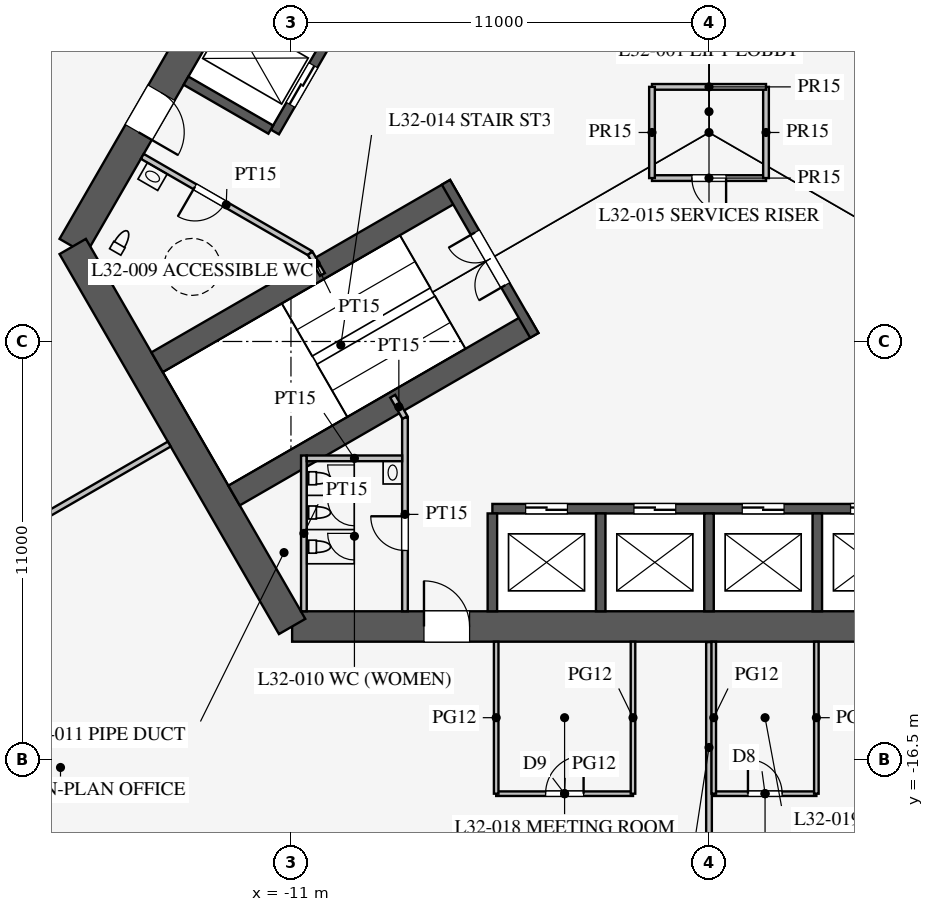
"""IFC4 building model, lengths in metres.
Left out: names, types, materials, properties, quantities, classifications, styles, units other than length and angle.
Written with IfcOpenShell. Run it as: python <this file> out.ifc"""

import sys

from ifc_helpers import new_model, si_unit, direction, frame, frame_2d, origin, place, context, subcontext, project, spatial, rectangle, extrude, element, fill, save


model = new_model("IFC4")
c1 = context("Model", 3, precision=1e-05, world=origin(), true_north=direction((0.0, 1.0)))
c2 = subcontext(c1, "Body", "Model", "MODEL_VIEW")
j1 = project(units=[si_unit("LENGTHUNIT", "METRE"), si_unit("PLANEANGLEUNIT", "RADIAN")], contexts=[c1])
p1 = place(None, origin())
s1 = spatial("IfcSite", under=j1, at=p1, CompositionType="ELEMENT")
p2 = place(p1, origin())
s2 = spatial("IfcBuilding", under=s1, at=p2, CompositionType="ELEMENT")
p3 = place(p2, frame((0.0, 0.0, 140.9)))
s3 = spatial("IfcBuildingStorey", under=s2, at=p3, CompositionType="ELEMENT", Elevation=140.9)
p4 = place(p3, frame((-10.97, -13.0, 0.0), z_axis=(0.0, 0.0, 1.0), x_axis=(1.0, 0.0, 0.0)))
e1 = element("IfcWall", 1, at=p4, inside=s3, PredefinedType="SHEAR", context=c2, shape_type="SweptSolid", body=[
    extrude(rectangle(XDim=21.939, YDim=0.8, at=frame_2d((10.97, 0.0))), origin(), (0.0, 0.0, 1.0), 4.2),
])
p5 = place(p4, frame((17.27, 0.0, 0.0)))
e2 = element("IfcOpeningElement", 2, at=p5, cuts=e1, PredefinedType="OPENING", context=c2, shape_type="SweptSolid", body=[
    extrude(rectangle(XDim=1.2, YDim=2.1, at=frame_2d((0.6, 1.05))), frame((0.0, 0.41, 0.0), z_axis=(0.0, -1.0, 0.0), x_axis=(1.0, 0.0, 0.0)), (0.0, 0.0, 1.0), 0.82),
])
p6 = place(p4, frame((3.47, 0.0, 0.0)))
e3 = element("IfcOpeningElement", 3, at=p6, cuts=e1, PredefinedType="OPENING", context=c2, shape_type="SweptSolid", body=[
    extrude(rectangle(XDim=1.2, YDim=2.1, at=frame_2d((0.6, 1.05))), frame((0.0, 0.41, 0.0), z_axis=(0.0, -1.0, 0.0), x_axis=(1.0, 0.0, 0.0)), (0.0, 0.0, 1.0), 0.82),
])
p7 = place(p3, frame((-5.773, 16.0, 0.0), z_axis=(0.0, 0.0, 1.0), x_axis=(-0.500002442456, -0.866023993627, 0.0)))
e4 = element("IfcWall", 4, at=p7, inside=s3, PredefinedType="SHEAR", context=c2, shape_type="SweptSolid", body=[
    extrude(rectangle(XDim=21.939, YDim=0.8, at=frame_2d((10.97, 0.0))), origin(), (0.0, 0.0, 1.0), 4.2),
])
p8 = place(p7, frame((17.27, 0.0, 0.0)))
e5 = element("IfcOpeningElement", 5, at=p8, cuts=e4, PredefinedType="OPENING", context=c2, shape_type="SweptSolid", body=[
    extrude(rectangle(XDim=1.2, YDim=2.1, at=frame_2d((0.6, 1.05))), frame((0.0, 0.41, 0.0), z_axis=(0.0, -1.0, 0.0), x_axis=(1.0, 0.0, 0.0)), (0.0, 0.0, 1.0), 0.82),
])
p9 = place(p7, frame((3.47, 0.0, 0.0)))
e6 = element("IfcOpeningElement", 6, at=p9, cuts=e4, PredefinedType="OPENING", context=c2, shape_type="SweptSolid", body=[
    extrude(rectangle(XDim=1.2, YDim=2.1, at=frame_2d((0.6, 1.05))), frame((0.0, 0.41, 0.0), z_axis=(0.0, -1.0, 0.0), x_axis=(1.0, 0.0, 0.0)), (0.0, 0.0, 1.0), 0.82),
])
p10 = place(p3, frame((-16.743, -3.0, 0.0), z_axis=(0.0, 0.0, 1.0), x_axis=(0.499995765644, -0.866027848477, 0.0)))
e7 = element("IfcWall", 7, at=p10, inside=s3, PredefinedType="SHEAR", context=c2, shape_type="SweptSolid", body=[
    extrude(rectangle(XDim=11.547, YDim=0.8, at=frame_2d((5.773, 0.0))), origin(), (0.0, 0.0, 1.0), 4.2),
])
p11 = place(p3, frame((-5.7, -9.9, 0.0), z_axis=(0.0, 0.0, 1.0), x_axis=(1.0, 0.0, 0.0)))
e8 = element("IfcWall", 8, at=p11, inside=s3, PredefinedType="SHEAR", context=c2, shape_type="SweptSolid", body=[
    extrude(rectangle(XDim=11.4, YDim=0.25, at=frame_2d((5.7, 0.0))), origin(), (0.0, 0.0, 1.0), 4.2),
])
p12 = place(p11, frame((0.875, 0.0, 0.0)))
e9 = element("IfcOpeningElement", 9, at=p12, cuts=e8, PredefinedType="OPENING", context=c2, shape_type="SweptSolid", body=[
    extrude(rectangle(XDim=1.1, YDim=2.2, at=frame_2d((0.55, 1.1))), frame((0.0, 0.135, 0.0), z_axis=(0.0, -1.0, 0.0), x_axis=(1.0, 0.0, 0.0)), (0.0, 0.0, 1.0), 0.27),
])
p13 = place(p11, frame((3.725, 0.0, 0.0)))
e10 = element("IfcOpeningElement", 10, at=p13, cuts=e8, PredefinedType="OPENING", context=c2, shape_type="SweptSolid", body=[
    extrude(rectangle(XDim=1.1, YDim=2.2, at=frame_2d((0.55, 1.1))), frame((0.0, 0.135, 0.0), z_axis=(0.0, -1.0, 0.0), x_axis=(1.0, 0.0, 0.0)), (0.0, 0.0, 1.0), 0.27),
])
p14 = place(p11, frame((6.575, 0.0, 0.0)))
e11 = element("IfcOpeningElement", 11, at=p14, cuts=e8, PredefinedType="OPENING", context=c2, shape_type="SweptSolid", body=[
    extrude(rectangle(XDim=1.1, YDim=2.2, at=frame_2d((0.55, 1.1))), frame((0.0, 0.135, 0.0), z_axis=(0.0, -1.0, 0.0), x_axis=(1.0, 0.0, 0.0)), (0.0, 0.0, 1.0), 0.27),
])
p15 = place(p11, frame((9.425, 0.0, 0.0)))
e12 = element("IfcOpeningElement", 12, at=p15, cuts=e8, PredefinedType="OPENING", context=c2, shape_type="SweptSolid", body=[
    extrude(rectangle(XDim=1.1, YDim=2.2, at=frame_2d((0.55, 1.1))), frame((0.0, 0.135, 0.0), z_axis=(0.0, -1.0, 0.0), x_axis=(1.0, 0.0, 0.0)), (0.0, 0.0, 1.0), 0.27),
])
for number, where, z_axis, x_axis in (
    (13, (-5.7, -10.025, 0.0), (0.0, 0.0, 1.0), (0.0, -1.0, 0.0)),
    (14, (-2.85, -10.025, 0.0), (0.0, 0.0, 1.0), (0.0, -1.0, 0.0)),
    (15, (0.0, -10.025, 0.0), (0.0, 0.0, 1.0), (0.0, -1.0, 0.0)),
    (16, (2.85, -10.025, 0.0), (0.0, 0.0, 1.0), (0.0, -1.0, 0.0)),
):
    element("IfcWall", number, at=place(p3, frame(where, z_axis=z_axis, x_axis=x_axis)), inside=s3, PredefinedType="SHEAR", context=c2, shape_type="SweptSolid", body=[
        extrude(rectangle(XDim=2.575, YDim=0.25, at=frame_2d((1.288, 0.0))), origin(), (0.0, 0.0, 1.0), 4.2),
    ])
p16 = place(p3, frame((-5.724, 9.886, 0.0), z_axis=(0.0, 0.0, 1.0), x_axis=(-0.500001763848, -0.866024385424, 0.0)))
e17 = element("IfcWall", 17, at=p16, inside=s3, PredefinedType="SHEAR", context=c2, shape_type="SweptSolid", body=[
    extrude(rectangle(XDim=11.4, YDim=0.25, at=frame_2d((5.7, 0.0))), origin(), (0.0, 0.0, 1.0), 4.2),
])
p17 = place(p16, frame((6.525, 0.0, 0.0)))
e18 = element("IfcOpeningElement", 18, at=p17, cuts=e17, PredefinedType="OPENING", context=c2, shape_type="SweptSolid", body=[
    extrude(rectangle(XDim=1.2, YDim=2.2, at=frame_2d((0.6, 1.1))), frame((0.0, 0.135, 0.0), z_axis=(0.0, -1.0, 0.0), x_axis=(1.0, 0.0, 0.0)), (0.0, 0.0, 1.0), 0.27),
])
p18 = place(p16, frame((9.375, 0.0, 0.0)))
e19 = element("IfcOpeningElement", 19, at=p18, cuts=e17, PredefinedType="OPENING", context=c2, shape_type="SweptSolid", body=[
    extrude(rectangle(XDim=1.2, YDim=2.2, at=frame_2d((0.6, 1.1))), frame((0.0, 0.135, 0.0), z_axis=(0.0, -1.0, 0.0), x_axis=(1.0, 0.0, 0.0)), (0.0, 0.0, 1.0), 0.27),
])
p19 = place(p3, frame((-11.532, 0.076, 0.0), z_axis=(0.0, 0.0, 1.0), x_axis=(-0.866005588531, 0.500034319456, 0.0)))
e20 = element("IfcWall", 20, at=p19, inside=s3, PredefinedType="SHEAR", context=c2, shape_type="SweptSolid", body=[
    extrude(rectangle(XDim=2.575, YDim=0.25, at=frame_2d((1.288, 0.0))), origin(), (0.0, 0.0, 1.0), 4.2),
])
for number, where, z_axis, x_axis in (
    (21, (-6.663, -1.509, 0.0), (0.0, 0.0, 1.0), (-0.866, -0.5, 0.0)),
    (22, (-4.638, -5.016, 0.0), (0.0, 0.0, 1.0), (-0.866, -0.5, 0.0)),
):
    element("IfcWall", number, at=place(p3, frame(where, z_axis=z_axis, x_axis=x_axis)), inside=s3, PredefinedType="SHEAR", context=c2, shape_type="SweptSolid", body=[
        extrude(rectangle(XDim=9.075, YDim=0.6, at=frame_2d((4.538, 0.0))), origin(), (0.0, 0.0, 1.0), 4.2),
    ])
p20 = place(p3, frame((-6.922, -1.312, 0.0), z_axis=(0.0, 0.0, 1.0), x_axis=(0.499984536904, -0.866034331223, 0.0)))
e23 = element("IfcWall", 23, at=p20, inside=s3, PredefinedType="SHEAR", context=c2, shape_type="SweptSolid", body=[
    extrude(rectangle(XDim=4.65, YDim=0.25, at=frame_2d((2.325, 0.0))), origin(), (0.0, 0.0, 1.0), 4.2),
])
p21 = place(p20, frame((1.525, 0.0, 0.0)))
e24 = element("IfcOpeningElement", 24, at=p21, cuts=e23, PredefinedType="OPENING", context=c2, shape_type="SweptSolid", body=[
    extrude(rectangle(XDim=1.6, YDim=2.1, at=frame_2d((0.8, 1.05))), frame((0.0, 0.135, 0.0), z_axis=(0.0, -1.0, 0.0), x_axis=(1.0, 0.0, 0.0)), (0.0, 0.0, 1.0), 0.27),
])
p22 = place(p3, frame((-8.0, -7.5, 0.0), z_axis=(0.0, 0.0, 1.0), x_axis=(0.0, -1.0, 0.0)))
e25 = element("IfcWall", 25, at=p22, inside=s3, PredefinedType="PARTITIONING", context=c2, shape_type="SweptSolid", body=[
    extrude(rectangle(XDim=5.1, YDim=0.15, at=frame_2d((2.55, 0.0))), origin(), (0.0, 0.0, 1.0), 4.0),
])
p23 = place(p22, frame((2.6, 0.0, 0.0)))
e26 = element("IfcOpeningElement", 26, at=p23, cuts=e25, PredefinedType="OPENING", context=c2, shape_type="SweptSolid", body=[
    extrude(rectangle(XDim=0.9, YDim=2.1, at=frame_2d((0.45, 1.05))), frame((0.0, 0.085, 0.0), z_axis=(0.0, -1.0, 0.0), x_axis=(1.0, 0.0, 0.0)), (0.0, 0.0, 1.0), 0.17),
])
p24 = place(p3, frame((-10.495, -3.178, 0.0), z_axis=(0.0, 0.0, 1.0), x_axis=(-0.86602216432, 0.500005610874, 0.0)))
e27 = element("IfcWall", 27, at=p24, inside=s3, PredefinedType="PARTITIONING", context=c2, shape_type="SweptSolid", body=[
    extrude(rectangle(XDim=5.1, YDim=0.15, at=frame_2d((2.55, 0.0))), origin(), (0.0, 0.0, 1.0), 4.0),
])
p25 = place(p24, frame((2.6, 0.0, 0.0)))
e28 = element("IfcOpeningElement", 28, at=p25, cuts=e27, PredefinedType="OPENING", context=c2, shape_type="SweptSolid", body=[
    extrude(rectangle(XDim=0.9, YDim=2.1, at=frame_2d((0.45, 1.05))), frame((0.0, 0.085, 0.0), z_axis=(0.0, -1.0, 0.0), x_axis=(1.0, 0.0, 0.0)), (0.0, 0.0, 1.0), 0.17),
])
for number, where, z_axis, x_axis in (
    (29, (-10.495, -3.178, 0.0), (0.0, 0.0, 1.0), (0.5, -0.866, 0.0)),
    (30, (-8.0, -7.5, 0.0), (0.0, 0.0, 1.0), (-0.5, 0.866, 0.0)),
):
    element("IfcWall", number, at=place(p3, frame(where, z_axis=z_axis, x_axis=x_axis)), inside=s3, PredefinedType="PARTITIONING", context=c2, shape_type="SweptSolid", body=[
        extrude(rectangle(XDim=0.645, YDim=0.15, at=frame_2d((0.323, 0.0))), origin(), (0.0, 0.0, 1.0), 4.0),
    ])
p26 = place(p3, frame((-10.66, -8.5, 0.0), z_axis=(0.0, 0.0, 1.0), x_axis=(0.0, -1.0, 0.0)))
e31 = element("IfcWall", 31, at=p26, inside=s3, PredefinedType="PARTITIONING", context=c2, shape_type="SweptSolid", body=[
    extrude(rectangle(XDim=4.1, YDim=0.15, at=frame_2d((2.05, 0.0))), origin(), (0.0, 0.0, 1.0), 4.0),
])
p27 = place(p3, frame((-8.075, -8.575, 0.0), z_axis=(0.0, 0.0, 1.0), x_axis=(-1.0, 0.0, 0.0)))
e32 = element("IfcWall", 32, at=p27, inside=s3, PredefinedType="PARTITIONING", context=c2, shape_type="SweptSolid", body=[
    extrude(rectangle(XDim=2.51, YDim=0.15, at=frame_2d((1.255, 0.0))), origin(), (0.0, 0.0, 1.0), 4.0),
])
p28 = place(p3, frame((-1.5, -1.2, 0.0), z_axis=(0.0, 0.0, 1.0), x_axis=(1.0, 0.0, 0.0)))
e33 = element("IfcWall", 33, at=p28, inside=s3, PredefinedType="PARTITIONING", context=c2, shape_type="SweptSolid", body=[
    extrude(rectangle(XDim=3.0, YDim=0.15, at=frame_2d((1.5, 0.0))), origin(), (0.0, 0.0, 1.0), 4.0),
])
p29 = place(p28, frame((1.05, 0.0, 0.0)))
e34 = element("IfcOpeningElement", 34, at=p29, cuts=e33, PredefinedType="OPENING", context=c2, shape_type="SweptSolid", body=[
    extrude(rectangle(XDim=0.9, YDim=2.1, at=frame_2d((0.45, 1.05))), frame((0.0, 0.085, 0.0), z_axis=(0.0, -1.0, 0.0), x_axis=(1.0, 0.0, 0.0)), (0.0, 0.0, 1.0), 0.17),
])
p30 = place(p3, frame((1.5, -1.2, 0.0), z_axis=(0.0, 0.0, 1.0), x_axis=(0.0, 1.0, 0.0)))
e35 = element("IfcWall", 35, at=p30, inside=s3, PredefinedType="PARTITIONING", context=c2, shape_type="SweptSolid", body=[
    extrude(rectangle(XDim=2.4, YDim=0.15, at=frame_2d((1.2, 0.0))), origin(), (0.0, 0.0, 1.0), 4.0),
])
p31 = place(p3, frame((1.5, 1.2, 0.0), z_axis=(0.0, 0.0, 1.0), x_axis=(-1.0, 0.0, 0.0)))
e36 = element("IfcWall", 36, at=p31, inside=s3, PredefinedType="PARTITIONING", context=c2, shape_type="SweptSolid", body=[
    extrude(rectangle(XDim=3.0, YDim=0.15, at=frame_2d((1.5, 0.0))), origin(), (0.0, 0.0, 1.0), 4.0),
])
p32 = place(p3, frame((-1.5, 1.2, 0.0), z_axis=(0.0, 0.0, 1.0), x_axis=(0.0, -1.0, 0.0)))
e37 = element("IfcWall", 37, at=p32, inside=s3, PredefinedType="PARTITIONING", context=c2, shape_type="SweptSolid", body=[
    extrude(rectangle(XDim=2.4, YDim=0.15, at=frame_2d((1.2, 0.0))), origin(), (0.0, 0.0, 1.0), 4.0),
])
p33 = place(p3, frame((-14.203, -8.2, 0.0), z_axis=(0.0, 0.0, 1.0), x_axis=(-0.866024668836, -0.500001272966, 0.0)))
e38 = element("IfcWall", 38, at=p33, inside=s3, PredefinedType="PARTITIONING", context=c2, shape_type="SweptSolid", body=[
    extrude(rectangle(XDim=16.65, YDim=0.15, at=frame_2d((8.325, 0.0))), origin(), (0.0, 0.0, 1.0), 2.3),
])
p34 = place(p3, frame((0.0, -13.41, 0.0), z_axis=(0.0, 0.0, 1.0), x_axis=(0.0, -1.0, 0.0)))
e39 = element("IfcWall", 39, at=p34, inside=s3, PredefinedType="PARTITIONING", context=c2, shape_type="SweptSolid", body=[
    extrude(rectangle(XDim=11.585, YDim=0.15, at=frame_2d((5.792, 0.0))), origin(), (0.0, 0.0, 1.0), 3.2),
])
p35 = place(p3, frame((0.125, -17.4, 0.0), z_axis=(0.0, 0.0, 1.0), x_axis=(1.0, 0.0, 0.0)))
e40 = element("IfcWall", 40, at=p35, inside=s3, PredefinedType="PARTITIONING", context=c2, shape_type="SweptSolid", body=[
    extrude(rectangle(XDim=2.7, YDim=0.12, at=frame_2d((1.35, 0.0))), origin(), (0.0, 0.0, 1.0), 2.9),
])
p36 = place(p35, frame((0.9, 0.0, 0.15)))
e41 = element("IfcOpeningElement", 41, at=p36, cuts=e40, PredefinedType="OPENING", context=c2, shape_type="SweptSolid", body=[
    extrude(rectangle(XDim=0.9, YDim=2.1, at=frame_2d((0.45, 1.05))), frame((0.0, 0.07, 0.0), z_axis=(0.0, -1.0, 0.0), x_axis=(1.0, 0.0, 0.0)), (0.0, 0.0, 1.0), 0.14),
])
p37 = place(p3, frame((-5.6, -17.4, 0.0), z_axis=(0.0, 0.0, 1.0), x_axis=(1.0, 0.0, 0.0)))
e42 = element("IfcWall", 42, at=p37, inside=s3, PredefinedType="PARTITIONING", context=c2, shape_type="SweptSolid", body=[
    extrude(rectangle(XDim=3.6, YDim=0.12, at=frame_2d((1.8, 0.0))), origin(), (0.0, 0.0, 1.0), 2.9),
])
p38 = place(p37, frame((1.3, 0.0, 0.15)))
e43 = element("IfcOpeningElement", 43, at=p38, cuts=e42, PredefinedType="OPENING", context=c2, shape_type="SweptSolid", body=[
    extrude(rectangle(XDim=1.0, YDim=2.1, at=frame_2d((0.5, 1.05))), frame((0.0, 0.07, 0.0), z_axis=(0.0, -1.0, 0.0), x_axis=(1.0, 0.0, 0.0)), (0.0, 0.0, 1.0), 0.14),
])
for number, where, z_axis, x_axis in (
    (44, (0.125, -13.4, 0.0), (0.0, 0.0, 1.0), (0.0, -1.0, 0.0)),
    (45, (2.825, -13.4, 0.0), (0.0, 0.0, 1.0), (0.0, -1.0, 0.0)),
    (46, (-2.0, -13.4, 0.0), (0.0, 0.0, 1.0), (0.0, -1.0, 0.0)),
    (47, (-5.6, -13.4, 0.0), (0.0, 0.0, 1.0), (0.0, -1.0, 0.0)),
):
    element("IfcWall", number, at=place(p3, frame(where, z_axis=z_axis, x_axis=x_axis)), inside=s3, PredefinedType="PARTITIONING", context=c2, shape_type="SweptSolid", body=[
        extrude(rectangle(XDim=4.0, YDim=0.12, at=frame_2d((2.0, 0.0))), origin(), (0.0, 0.0, 1.0), 2.9),
    ])
p39 = place(p23, frame((0.9, 0.0, 0.0), z_axis=(0.0, 0.0, 1.0), x_axis=(-1.0, 0.0, 0.0)))
e48 = element("IfcDoor", 48, at=p39, inside=s3, OperationType="SINGLE_SWING_RIGHT", PredefinedType="DOOR", context=c2, shape_type="SweptSolid", body=[
    extrude(rectangle(XDim=0.9, YDim=2.1, at=frame_2d((0.45, 1.05))), frame((0.0, 0.025, 0.0), z_axis=(0.0, -1.0, 0.0), x_axis=(1.0, 0.0, 0.0)), (0.0, 0.0, 1.0), 0.05),
])
fill(e26, e48)
p40 = place(p25, origin())
e49 = element("IfcDoor", 49, at=p40, inside=s3, OperationType="SINGLE_SWING_RIGHT", PredefinedType="DOOR", context=c2, shape_type="SweptSolid", body=[
    extrude(rectangle(XDim=0.9, YDim=2.1, at=frame_2d((0.45, 1.05))), frame((0.0, 0.025, 0.0), z_axis=(0.0, -1.0, 0.0), x_axis=(1.0, 0.0, 0.0)), (0.0, 0.0, 1.0), 0.05),
])
fill(e28, e49)
p41 = place(p29, frame((0.9, 0.0, 0.0), z_axis=(0.0, 0.0, 1.0), x_axis=(-1.0, 0.0, 0.0)))
e50 = element("IfcDoor", 50, at=p41, inside=s3, OperationType="SINGLE_SWING_LEFT", PredefinedType="DOOR", context=c2, shape_type="SweptSolid", body=[
    extrude(rectangle(XDim=0.9, YDim=2.1, at=frame_2d((0.45, 1.05))), frame((0.0, 0.025, 0.0), z_axis=(0.0, -1.0, 0.0), x_axis=(1.0, 0.0, 0.0)), (0.0, 0.0, 1.0), 0.05),
])
fill(e34, e50)
p42 = place(p21, frame((1.6, 0.0, 0.0), z_axis=(0.0, 0.0, 1.0), x_axis=(-1.0, 0.0, 0.0)))
e51 = element("IfcDoor", 51, at=p42, inside=s3, OperationType="DOUBLE_DOOR_SINGLE_SWING", PredefinedType="DOOR", context=c2, shape_type="SweptSolid", body=[
    extrude(rectangle(XDim=1.6, YDim=2.1, at=frame_2d((0.8, 1.05))), frame((0.0, 0.025, 0.0), z_axis=(0.0, -1.0, 0.0), x_axis=(1.0, 0.0, 0.0)), (0.0, 0.0, 1.0), 0.05),
])
fill(e24, e51)
p43 = place(p6, origin())
e52 = element("IfcDoor", 52, at=p43, inside=s3, OperationType="SINGLE_SWING_LEFT", PredefinedType="DOOR", context=c2, shape_type="SweptSolid", body=[
    extrude(rectangle(XDim=1.2, YDim=2.1, at=frame_2d((0.6, 1.05))), frame((0.0, 0.025, 0.0), z_axis=(0.0, -1.0, 0.0), x_axis=(1.0, 0.0, 0.0)), (0.0, 0.0, 1.0), 0.05),
])
fill(e3, e52)
p44 = place(p8, origin())
e53 = element("IfcDoor", 53, at=p44, inside=s3, OperationType="SINGLE_SWING_RIGHT", PredefinedType="DOOR", context=c2, shape_type="SweptSolid", body=[
    extrude(rectangle(XDim=1.2, YDim=2.1, at=frame_2d((0.6, 1.05))), frame((0.0, 0.025, 0.0), z_axis=(0.0, -1.0, 0.0), x_axis=(1.0, 0.0, 0.0)), (0.0, 0.0, 1.0), 0.05),
])
fill(e5, e53)
p45 = place(p38, origin())
e54 = element("IfcDoor", 54, at=p45, inside=s3, OperationType="SINGLE_SWING_RIGHT", PredefinedType="DOOR", context=c2, shape_type="SweptSolid", body=[
    extrude(rectangle(XDim=1.0, YDim=2.1, at=frame_2d((0.5, 1.05))), frame((0.0, 0.025, 0.0), z_axis=(0.0, -1.0, 0.0), x_axis=(1.0, 0.0, 0.0)), (0.0, 0.0, 1.0), 0.05),
])
fill(e43, e54)
p46 = place(p36, origin())
e55 = element("IfcDoor", 55, at=p46, inside=s3, OperationType="SINGLE_SWING_LEFT", PredefinedType="DOOR", context=c2, shape_type="SweptSolid", body=[
    extrude(rectangle(XDim=0.9, YDim=2.1, at=frame_2d((0.45, 1.05))), frame((0.0, 0.025, 0.0), z_axis=(0.0, -1.0, 0.0), x_axis=(1.0, 0.0, 0.0)), (0.0, 0.0, 1.0), 0.05),
])
fill(e41, e55)
p47 = place(p12, origin())
e56 = element("IfcDoor", 56, at=p47, inside=s3, OperationType="DOUBLE_DOOR_SLIDING", PredefinedType="DOOR", context=c2, shape_type="SweptSolid", body=[
    extrude(rectangle(XDim=1.1, YDim=2.2, at=frame_2d((0.55, 1.1))), frame((0.0, 0.025, 0.0), z_axis=(0.0, -1.0, 0.0), x_axis=(1.0, 0.0, 0.0)), (0.0, 0.0, 1.0), 0.05),
])
fill(e9, e56)
p48 = place(p13, origin())
e57 = element("IfcDoor", 57, at=p48, inside=s3, OperationType="DOUBLE_DOOR_SLIDING", PredefinedType="DOOR", context=c2, shape_type="SweptSolid", body=[
    extrude(rectangle(XDim=1.1, YDim=2.2, at=frame_2d((0.55, 1.1))), frame((0.0, 0.025, 0.0), z_axis=(0.0, -1.0, 0.0), x_axis=(1.0, 0.0, 0.0)), (0.0, 0.0, 1.0), 0.05),
])
fill(e10, e57)
p49 = place(p14, origin())
e58 = element("IfcDoor", 58, at=p49, inside=s3, OperationType="DOUBLE_DOOR_SLIDING", PredefinedType="DOOR", context=c2, shape_type="SweptSolid", body=[
    extrude(rectangle(XDim=1.1, YDim=2.2, at=frame_2d((0.55, 1.1))), frame((0.0, 0.025, 0.0), z_axis=(0.0, -1.0, 0.0), x_axis=(1.0, 0.0, 0.0)), (0.0, 0.0, 1.0), 0.05),
])
fill(e11, e58)
p50 = place(p15, origin())
e59 = element("IfcDoor", 59, at=p50, inside=s3, OperationType="DOUBLE_DOOR_SLIDING", PredefinedType="DOOR", context=c2, shape_type="SweptSolid", body=[
    extrude(rectangle(XDim=1.1, YDim=2.2, at=frame_2d((0.55, 1.1))), frame((0.0, 0.025, 0.0), z_axis=(0.0, -1.0, 0.0), x_axis=(1.0, 0.0, 0.0)), (0.0, 0.0, 1.0), 0.05),
])
fill(e12, e59)
p51 = place(p18, origin())
e60 = element("IfcDoor", 60, at=p51, inside=s3, OperationType="DOUBLE_DOOR_SLIDING", PredefinedType="DOOR", context=c2, shape_type="SweptSolid", body=[
    extrude(rectangle(XDim=1.2, YDim=2.2, at=frame_2d((0.6, 1.1))), frame((0.0, 0.025, 0.0), z_axis=(0.0, -1.0, 0.0), x_axis=(1.0, 0.0, 0.0)), (0.0, 0.0, 1.0), 0.05),
])
fill(e19, e60)
save(model, sys.argv[1])
